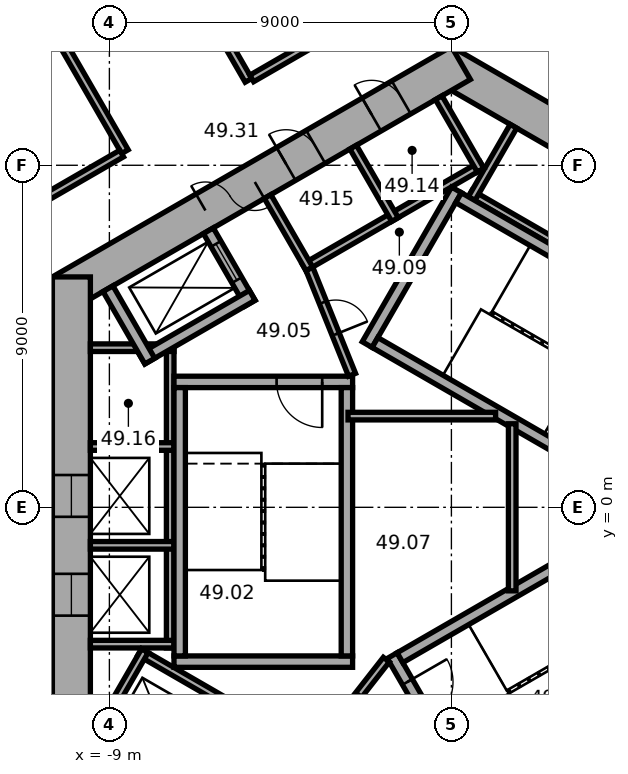
"""IFC4 building model, lengths in metres.
Left out: names, types, materials, properties, quantities, classifications, styles, units other than length and angle.
Written with IfcOpenShell. Run it as: python <this file> out.ifc"""

import sys

from ifc_helpers import new_model, si_unit, direction, frame, frame_2d, origin, place, context, subcontext, project, spatial, rectangle, extrude, element, fill, save


model = new_model("IFC4")
c1 = context("Model", 3, precision=1e-05, world=origin(), true_north=direction((0.0, 1.0)))
c2 = subcontext(c1, "Body", "Model", "MODEL_VIEW")
j1 = project(units=[si_unit("LENGTHUNIT", "METRE"), si_unit("PLANEANGLEUNIT", "RADIAN")], contexts=[c1])
p1 = place(None, origin())
s1 = spatial("IfcSite", under=j1, at=p1, CompositionType="ELEMENT")
p2 = place(p1, origin())
s2 = spatial("IfcBuilding", under=s1, at=p2, CompositionType="ELEMENT")
p3 = place(p2, frame((0.0, 0.0, 198.4)))
s3 = spatial("IfcBuildingStorey", under=s2, at=p3, CompositionType="ELEMENT", Elevation=198.4)
p4 = place(p3, frame((10.25, 5.629, 0.0), z_axis=(0.0, 0.0, 1.0), x_axis=(-0.866022616891, 0.50000482701, 0.0)))
e1 = element("IfcWall", 1, at=p4, inside=s3, PredefinedType="SHEAR", context=c2, shape_type="SweptSolid", body=[
    extrude(rectangle(XDim=12.125, YDim=1.0, at=frame_2d((6.062, 0.0))), origin(), (0.0, 0.0, 1.0), 3.7),
])
p5 = place(p4, frame((2.712, 0.0, 0.0)))
e2 = element("IfcOpeningElement", 2, at=p5, cuts=e1, PredefinedType="OPENING", context=c2, shape_type="SweptSolid", body=[
    extrude(rectangle(XDim=0.9, YDim=2.1, at=frame_2d((0.45, 1.05))), frame((0.0, 0.51, 0.0), z_axis=(0.0, -1.0, 0.0), x_axis=(1.0, 0.0, 0.0)), (0.0, 0.0, 1.0), 1.02),
])
p6 = place(p4, frame((6.612, 0.0, 0.0)))
e3 = element("IfcOpeningElement", 3, at=p6, cuts=e1, PredefinedType="OPENING", context=c2, shape_type="SweptSolid", body=[
    extrude(rectangle(XDim=0.9, YDim=2.1, at=frame_2d((0.45, 1.05))), frame((0.0, 0.51, 0.0), z_axis=(0.0, -1.0, 0.0), x_axis=(1.0, 0.0, 0.0)), (0.0, 0.0, 1.0), 1.02),
])
p7 = place(p3, frame((0.25, 11.691, 0.0), z_axis=(0.0, 0.0, 1.0), x_axis=(-0.866022616891, -0.50000482701, 0.0)))
e4 = element("IfcWall", 4, at=p7, inside=s3, PredefinedType="SHEAR", context=c2, shape_type="SweptSolid", body=[
    extrude(rectangle(XDim=12.125, YDim=1.0, at=frame_2d((6.062, 0.0))), origin(), (0.0, 0.0, 1.0), 3.7),
])
p8 = place(p7, frame((6.262, 0.0, 0.0)))
e5 = element("IfcOpeningElement", 5, at=p8, cuts=e4, PredefinedType="OPENING", context=c2, shape_type="SweptSolid", body=[
    extrude(rectangle(XDim=1.5, YDim=2.1, at=frame_2d((0.75, 1.05))), frame((0.0, 0.51, 0.0), z_axis=(0.0, -1.0, 0.0), x_axis=(1.0, 0.0, 0.0)), (0.0, 0.0, 1.0), 1.02),
])
p9 = place(p7, frame((1.812, 0.0, 0.0)))
e6 = element("IfcOpeningElement", 6, at=p9, cuts=e4, PredefinedType="OPENING", context=c2, shape_type="SweptSolid", body=[
    extrude(rectangle(XDim=0.9, YDim=2.1, at=frame_2d((0.45, 1.05))), frame((0.0, 0.51, 0.0), z_axis=(0.0, -1.0, 0.0), x_axis=(1.0, 0.0, 0.0)), (0.0, 0.0, 1.0), 1.02),
])
p10 = place(p7, frame((4.412, 0.0, 0.0)))
e7 = element("IfcOpeningElement", 7, at=p10, cuts=e4, PredefinedType="OPENING", context=c2, shape_type="SweptSolid", body=[
    extrude(rectangle(XDim=0.9, YDim=2.1, at=frame_2d((0.45, 1.05))), frame((0.0, 0.51, 0.0), z_axis=(0.0, -1.0, 0.0), x_axis=(1.0, 0.0, 0.0)), (0.0, 0.0, 1.0), 1.02),
])
p11 = place(p3, frame((-10.0, 6.062, 0.0), z_axis=(0.0, 0.0, 1.0), x_axis=(0.0, -1.0, 0.0)))
e8 = element("IfcWall", 8, at=p11, inside=s3, PredefinedType="SHEAR", context=c2, shape_type="SweptSolid", body=[
    extrude(rectangle(XDim=12.125, YDim=1.0, at=frame_2d((6.062, 0.0))), origin(), (0.0, 0.0, 1.0), 3.7),
])
p12 = place(p11, frame((5.212, 0.0, 0.0)))
e9 = element("IfcOpeningElement", 9, at=p12, cuts=e8, PredefinedType="OPENING", context=c2, shape_type="SweptSolid", body=[
    extrude(rectangle(XDim=1.1, YDim=2.1, at=frame_2d((0.55, 1.05))), frame((0.0, 0.51, 0.0), z_axis=(0.0, -1.0, 0.0), x_axis=(1.0, 0.0, 0.0)), (0.0, 0.0, 1.0), 1.02),
])
p13 = place(p11, frame((7.812, 0.0, 0.0)))
e10 = element("IfcOpeningElement", 10, at=p13, cuts=e8, PredefinedType="OPENING", context=c2, shape_type="SweptSolid", body=[
    extrude(rectangle(XDim=1.1, YDim=2.1, at=frame_2d((0.55, 1.05))), frame((0.0, 0.51, 0.0), z_axis=(0.0, -1.0, 0.0), x_axis=(1.0, 0.0, 0.0)), (0.0, 0.0, 1.0), 1.02),
])
p14 = place(p3, frame((7.424, 4.259, 0.0), z_axis=(0.0, 0.0, 1.0), x_axis=(-0.866026010844, 0.49999894854, 0.0)))
e11 = element("IfcWall", 11, at=p14, inside=s3, PredefinedType="PARTITIONING", context=c2, shape_type="SweptSolid", body=[
    extrude(rectangle(XDim=8.0, YDim=0.2, at=frame_2d((4.0, 0.0))), origin(), (0.0, 0.0, 1.0), 3.42),
])
p15 = place(p3, frame((0.532, 8.122, 0.0), z_axis=(0.0, 0.0, 1.0), x_axis=(0.500077893725, 0.86598042715, 0.0)))
e12 = element("IfcWall", 12, at=p15, inside=s3, PredefinedType="PARTITIONING", context=c2, shape_type="SweptSolid", body=[
    extrude(rectangle(XDim=2.2, YDim=0.2, at=frame_2d((1.1, 0.0))), origin(), (0.0, 0.0, 1.0), 3.42),
])
p16 = place(p3, frame((0.803, 9.009, 0.0), z_axis=(0.0, 0.0, 1.0), x_axis=(-0.866028230842, -0.499995103361, 0.0)))
e13 = element("IfcWall", 13, at=p16, inside=s3, PredefinedType="PARTITIONING", context=c2, shape_type="SweptSolid", body=[
    extrude(rectangle(XDim=5.4, YDim=0.2, at=frame_2d((2.7, 0.0))), origin(), (0.0, 0.0, 1.0), 3.42),
])
p17 = place(p3, frame((0.767, 8.872, 0.0), z_axis=(0.0, 0.0, 1.0), x_axis=(-0.499994660107, 0.866028486751, 0.0)))
e14 = element("IfcWall", 14, at=p17, inside=s3, PredefinedType="PARTITIONING", context=c2, shape_type="SweptSolid", body=[
    extrude(rectangle(XDim=2.2, YDim=0.2, at=frame_2d((1.1, 0.0))), origin(), (0.0, 0.0, 1.0), 3.42),
])
for number, where, z_axis, x_axis in (
    (15, (-1.485, 7.572, 0.0), (0.0, 0.0, 1.0), (-0.5, 0.866, 0.0)),
    (16, (-3.737, 6.272, 0.0), (0.0, 0.0, 1.0), (-0.5, 0.866, 0.0)),
):
    element("IfcWall", number, at=place(p3, frame(where, z_axis=z_axis, x_axis=x_axis)), inside=s3, PredefinedType="PARTITIONING", context=c2, shape_type="SweptSolid", body=[
        extrude(rectangle(XDim=2.2, YDim=0.2, at=frame_2d((1.1, 0.0))), origin(), (0.0, 0.0, 1.0), 3.42),
    ])
p18 = place(p3, frame((-7.4, 4.3, 0.0), z_axis=(0.0, 0.0, 1.0), x_axis=(0.0, -1.0, 0.0)))
e17 = element("IfcWall", 17, at=p18, inside=s3, PredefinedType="PARTITIONING", context=c2, shape_type="SweptSolid", body=[
    extrude(rectangle(XDim=8.0, YDim=0.2, at=frame_2d((4.0, 0.0))), origin(), (0.0, 0.0, 1.0), 3.42),
])
for number, where, z_axis, x_axis in (
    (18, (-7.3, 4.2, 0.0), (0.0, 0.0, 1.0), (-1.0, 0.0, 0.0)),
    (19, (-7.3, 1.6, 0.0), (0.0, 0.0, 1.0), (-1.0, 0.0, 0.0)),
    (20, (-7.3, -1.0, 0.0), (0.0, 0.0, 1.0), (-1.0, 0.0, 0.0)),
    (21, (-7.3, -3.6, 0.0), (0.0, 0.0, 1.0), (-1.0, 0.0, 0.0)),
):
    element("IfcWall", number, at=place(p3, frame(where, z_axis=z_axis, x_axis=x_axis)), inside=s3, PredefinedType="PARTITIONING", context=c2, shape_type="SweptSolid", body=[
        extrude(rectangle(XDim=2.2, YDim=0.2, at=frame_2d((1.1, 0.0))), origin(), (0.0, 0.0, 1.0), 3.42),
    ])
p19 = place(p3, frame((-8.203, -3.809, 0.0), z_axis=(0.0, 0.0, 1.0), x_axis=(0.866028230842, -0.499995103361, 0.0)))
e22 = element("IfcWall", 22, at=p19, inside=s3, PredefinedType="PARTITIONING", context=c2, shape_type="SweptSolid", body=[
    extrude(rectangle(XDim=5.4, YDim=0.2, at=frame_2d((2.7, 0.0))), origin(), (0.0, 0.0, 1.0), 3.42),
])
p20 = place(p3, frame((-8.067, -3.772, 0.0), z_axis=(0.0, 0.0, 1.0), x_axis=(-0.50002983664, -0.866008176907, 0.0)))
e23 = element("IfcWall", 23, at=p20, inside=s3, PredefinedType="PARTITIONING", context=c2, shape_type="SweptSolid", body=[
    extrude(rectangle(XDim=2.2, YDim=0.2, at=frame_2d((1.1, 0.0))), origin(), (0.0, 0.0, 1.0), 3.42),
])
p21 = place(p3, frame((-0.024, -8.559, 0.0), z_axis=(0.0, 0.0, 1.0), x_axis=(0.866026010844, 0.49999894854, 0.0)))
e24 = element("IfcWall", 24, at=p21, inside=s3, PredefinedType="PARTITIONING", context=c2, shape_type="SweptSolid", body=[
    extrude(rectangle(XDim=8.0, YDim=0.2, at=frame_2d((4.0, 0.0))), origin(), (0.0, 0.0, 1.0), 3.42),
])
p22 = place(p3, frame((-2.216, 4.282, 0.0), z_axis=(0.0, 0.0, 1.0), x_axis=(0.499977259774, 0.866038532462, 0.0)))
e25 = element("IfcWall", 25, at=p22, inside=s3, PredefinedType="SHEAR", context=c2, shape_type="SweptSolid", body=[
    extrude(rectangle(XDim=4.7, YDim=0.3, at=frame_2d((2.35, 0.0))), origin(), (0.0, 0.0, 1.0), 3.42),
])
for number, where, z_axis, x_axis in (
    (26, (4.103, 0.807, 0.0), (0.0, 0.0, 1.0), (-0.866, 0.5, 0.0)),
    (27, (6.303, 4.617, 0.0), (0.0, 0.0, 1.0), (-0.866, 0.5, 0.0)),
):
    element("IfcWall", number, at=place(p3, frame(where, z_axis=z_axis, x_axis=x_axis)), inside=s3, PredefinedType="SHEAR", context=c2, shape_type="SweptSolid", body=[
        extrude(rectangle(XDim=7.06, YDim=0.3, at=frame_2d((3.53, 0.0))), origin(), (0.0, 0.0, 1.0), 3.42),
    ])
p23 = place(p3, frame((-2.6, 3.3, 0.0), z_axis=(0.0, 0.0, 1.0), x_axis=(-1.0, 0.0, 0.0)))
e28 = element("IfcWall", 28, at=p23, inside=s3, PredefinedType="SHEAR", context=c2, shape_type="SweptSolid", body=[
    extrude(rectangle(XDim=4.7, YDim=0.3, at=frame_2d((2.35, 0.0))), origin(), (0.0, 0.0, 1.0), 3.42),
])
p24 = place(p23, frame((0.8, 0.0, 0.0)))
e29 = element("IfcOpeningElement", 29, at=p24, cuts=e28, PredefinedType="OPENING", context=c2, shape_type="SweptSolid", body=[
    extrude(rectangle(XDim=1.2, YDim=2.1, at=frame_2d((0.6, 1.05))), frame((0.0, 0.16, 0.0), z_axis=(0.0, -1.0, 0.0), x_axis=(1.0, 0.0, 0.0)), (0.0, 0.0, 1.0), 0.32),
])
p25 = place(p3, frame((-2.6, -4.06, 0.0), z_axis=(0.0, 0.0, 1.0), x_axis=(-1.0, 0.0, 0.0)))
e30 = element("IfcWall", 30, at=p25, inside=s3, PredefinedType="SHEAR", context=c2, shape_type="SweptSolid", body=[
    extrude(rectangle(XDim=4.7, YDim=0.3, at=frame_2d((2.35, 0.0))), origin(), (0.0, 0.0, 1.0), 3.42),
])
for number, where, z_axis, x_axis in (
    (31, (-2.75, 3.15, 0.0), (0.0, 0.0, 1.0), (0.0, -1.0, 0.0)),
    (32, (-7.15, 3.15, 0.0), (0.0, 0.0, 1.0), (0.0, -1.0, 0.0)),
):
    element("IfcWall", number, at=place(p3, frame(where, z_axis=z_axis, x_axis=x_axis)), inside=s3, PredefinedType="SHEAR", context=c2, shape_type="SweptSolid", body=[
        extrude(rectangle(XDim=7.06, YDim=0.3, at=frame_2d((3.53, 0.0))), origin(), (0.0, 0.0, 1.0), 3.42),
    ])
p26 = place(p3, frame((-1.558, -3.902, 0.0), z_axis=(0.0, 0.0, 1.0), x_axis=(0.499977259774, -0.866038532462, 0.0)))
e33 = element("IfcWall", 33, at=p26, inside=s3, PredefinedType="SHEAR", context=c2, shape_type="SweptSolid", body=[
    extrude(rectangle(XDim=4.7, YDim=0.3, at=frame_2d((2.35, 0.0))), origin(), (0.0, 0.0, 1.0), 3.42),
])
p27 = place(p26, frame((0.8, 0.0, 0.0)))
e34 = element("IfcOpeningElement", 34, at=p27, cuts=e33, PredefinedType="OPENING", context=c2, shape_type="SweptSolid", body=[
    extrude(rectangle(XDim=1.2, YDim=2.1, at=frame_2d((0.6, 1.05))), frame((0.0, 0.16, 0.0), z_axis=(0.0, -1.0, 0.0), x_axis=(1.0, 0.0, 0.0)), (0.0, 0.0, 1.0), 0.32),
])
for number, where, z_axis, x_axis in (
    (35, (-1.353, -3.957, 0.0), (0.0, 0.0, 1.0), (0.866, 0.5, 0.0)),
    (36, (0.847, -7.767, 0.0), (0.0, 0.0, 1.0), (0.866, 0.5, 0.0)),
):
    element("IfcWall", number, at=place(p3, frame(where, z_axis=z_axis, x_axis=x_axis)), inside=s3, PredefinedType="SHEAR", context=c2, shape_type="SweptSolid", body=[
        extrude(rectangle(XDim=7.06, YDim=0.3, at=frame_2d((3.53, 0.0))), origin(), (0.0, 0.0, 1.0), 3.42),
    ])
p28 = place(p3, frame((-5.295, 5.372, 0.0), z_axis=(0.0, 0.0, 1.0), x_axis=(-0.500077893725, 0.86598042715, 0.0)))
e37 = element("IfcWall", 37, at=p28, inside=s3, PredefinedType="SHEAR", context=c2, shape_type="SweptSolid", body=[
    extrude(rectangle(XDim=2.2, YDim=0.3, at=frame_2d((1.1, 0.0))), origin(), (0.0, 0.0, 1.0), 3.42),
])
p29 = place(p28, frame((0.7, 0.0, 0.0)))
e38 = element("IfcOpeningElement", 38, at=p29, cuts=e37, PredefinedType="OPENING", context=c2, shape_type="SweptSolid", body=[
    extrude(rectangle(XDim=1.1, YDim=2.1, at=frame_2d((0.55, 1.05))), frame((0.0, 0.16, 0.0), z_axis=(0.0, -1.0, 0.0), x_axis=(1.0, 0.0, 0.0)), (0.0, 0.0, 1.0), 0.32),
])
p30 = place(p3, frame((-5.24, 5.577, 0.0), z_axis=(0.0, 0.0, 1.0), x_axis=(-0.866014461049, -0.500018952895, 0.0)))
e39 = element("IfcWall", 39, at=p30, inside=s3, PredefinedType="SHEAR", context=c2, shape_type="SweptSolid", body=[
    extrude(rectangle(XDim=3.35, YDim=0.3, at=frame_2d((1.675, 0.0))), origin(), (0.0, 0.0, 1.0), 3.42),
])
p31 = place(p3, frame((-7.937, 3.847, 0.0), z_axis=(0.0, 0.0, 1.0), x_axis=(-0.50002983664, 0.866008176907, 0.0)))
e40 = element("IfcWall", 40, at=p31, inside=s3, PredefinedType="SHEAR", context=c2, shape_type="SweptSolid", body=[
    extrude(rectangle(XDim=2.2, YDim=0.3, at=frame_2d((1.1, 0.0))), origin(), (0.0, 0.0, 1.0), 3.42),
])
p32 = place(p3, frame((-2.615, 3.487, 0.0), z_axis=(0.0, 0.0, 1.0), x_axis=(-0.373576831041, 0.92759924068, 0.0)))
e41 = element("IfcWall", 41, at=p32, inside=s3, PredefinedType="PARTITIONING", context=c2, shape_type="SweptSolid", body=[
    extrude(rectangle(XDim=3.002, YDim=0.2, at=frame_2d((1.501, 0.0))), origin(), (0.0, 0.0, 1.0), 3.42),
])
p33 = place(p32, frame((1.15, 0.0, 0.0)))
e42 = element("IfcOpeningElement", 42, at=p33, cuts=e41, PredefinedType="OPENING", context=c2, shape_type="SweptSolid", body=[
    extrude(rectangle(XDim=0.9, YDim=2.1, at=frame_2d((0.45, 1.05))), frame((0.0, 0.11, 0.0), z_axis=(0.0, -1.0, 0.0), x_axis=(1.0, 0.0, 0.0)), (0.0, 0.0, 1.0), 0.22),
])
p34 = place(p3, frame((-1.712, -4.008, 0.0), z_axis=(0.0, 0.0, 1.0), x_axis=(-0.616549420702, -0.787316208287, 0.0)))
e43 = element("IfcWall", 43, at=p34, inside=s3, PredefinedType="PARTITIONING", context=c2, shape_type="SweptSolid", body=[
    extrude(rectangle(XDim=3.002, YDim=0.2, at=frame_2d((1.501, 0.0))), origin(), (0.0, 0.0, 1.0), 3.42),
])
p35 = place(p34, frame((1.15, 0.0, 0.0)))
e44 = element("IfcOpeningElement", 44, at=p35, cuts=e43, PredefinedType="OPENING", context=c2, shape_type="SweptSolid", body=[
    extrude(rectangle(XDim=0.9, YDim=2.1, at=frame_2d((0.45, 1.05))), frame((0.0, 0.11, 0.0), z_axis=(0.0, -1.0, 0.0), x_axis=(1.0, 0.0, 0.0)), (0.0, 0.0, 1.0), 0.22),
])
p36 = place(p3, frame((-2.72, 2.4, 0.0), z_axis=(0.0, 0.0, 1.0), x_axis=(1.0, 0.0, 0.0)))
e45 = element("IfcWall", 45, at=p36, inside=s3, PredefinedType="PARTITIONING", context=c2, shape_type="SweptSolid", body=[
    extrude(rectangle(XDim=3.883, YDim=0.2, at=frame_2d((1.941, 0.0))), origin(), (0.0, 0.0, 1.0), 3.42),
])
p37 = place(p3, frame((1.6, -2.198, 0.0), z_axis=(0.0, 0.0, 1.0), x_axis=(0.0, 1.0, 0.0)))
e46 = element("IfcWall", 46, at=p37, inside=s3, PredefinedType="PARTITIONING", context=c2, shape_type="SweptSolid", body=[
    extrude(rectangle(XDim=4.397, YDim=0.2, at=frame_2d((2.198, 0.0))), origin(), (0.0, 0.0, 1.0), 3.42),
])
p38 = place(p3, frame((-12.766, 16.589, 0.0), z_axis=(0.0, 0.0, 1.0), x_axis=(0.500010139422, -0.866019549707, 0.0)))
e47 = element("IfcWall", 47, at=p38, inside=s3, PredefinedType="PARTITIONING", context=c2, shape_type="SweptSolid", body=[
    extrude(rectangle(XDim=8.35, YDim=0.2, at=frame_2d((4.175, 0.0))), origin(), (0.0, 0.0, 1.0), 3.42),
])
p39 = place(p38, frame((3.675, 0.0, 0.0)))
e48 = element("IfcOpeningElement", 48, at=p39, cuts=e47, PredefinedType="OPENING", context=c2, shape_type="SweptSolid", body=[
    extrude(rectangle(XDim=1.0, YDim=2.1, at=frame_2d((0.5, 1.05))), frame((0.0, 0.11, 0.0), z_axis=(0.0, -1.0, 0.0), x_axis=(1.0, 0.0, 0.0)), (0.0, 0.0, 1.0), 0.22),
])
p40 = place(p3, frame((-9.515, 18.466, 0.0), z_axis=(0.0, 0.0, 1.0), x_axis=(0.500010139422, -0.866019549707, 0.0)))
e49 = element("IfcWall", 49, at=p40, inside=s3, PredefinedType="PARTITIONING", context=c2, shape_type="SweptSolid", body=[
    extrude(rectangle(XDim=8.35, YDim=0.2, at=frame_2d((4.175, 0.0))), origin(), (0.0, 0.0, 1.0), 2.87),
])
p41 = place(p40, frame((3.675, 0.0, 0.0)))
e50 = element("IfcOpeningElement", 50, at=p41, cuts=e49, PredefinedType="OPENING", context=c2, shape_type="SweptSolid", body=[
    extrude(rectangle(XDim=1.0, YDim=2.1, at=frame_2d((0.5, 1.05))), frame((0.0, 0.11, 0.0), z_axis=(0.0, -1.0, 0.0), x_axis=(1.0, 0.0, 0.0)), (0.0, 0.0, 1.0), 0.22),
])
p42 = place(p3, frame((-8.678, 9.308, 0.0), z_axis=(0.0, 0.0, 1.0), x_axis=(-0.866000359435, -0.500043375578, 0.0)))
e51 = element("IfcWall", 51, at=p42, inside=s3, PredefinedType="PARTITIONING", context=c2, shape_type="SweptSolid", body=[
    extrude(rectangle(XDim=3.161, YDim=0.2, at=frame_2d((1.581, 0.0))), origin(), (0.0, 0.0, 1.0), 3.42),
])
p43 = place(p3, frame((-0.95, 13.77, 0.0), z_axis=(0.0, 0.0, 1.0), x_axis=(-0.866036689987, -0.499980451214, 0.0)))
e52 = element("IfcWall", 52, at=p43, inside=s3, PredefinedType="PARTITIONING", context=c2, shape_type="SweptSolid", body=[
    extrude(rectangle(XDim=4.969, YDim=0.2, at=frame_2d((2.485, 0.0))), origin(), (0.0, 0.0, 1.0), 3.42),
])
p44 = place(p3, frame((5.713, 11.02, 0.0), z_axis=(0.0, 0.0, 1.0), x_axis=(-0.866038905227, 0.499976614087, 0.0)))
e53 = element("IfcWall", 53, at=p44, inside=s3, PredefinedType="PARTITIONING", context=c2, shape_type="SweptSolid", body=[
    extrude(rectangle(XDim=5.46, YDim=0.2, at=frame_2d((2.73, 0.0))), origin(), (0.0, 0.0, 1.0), 3.42),
])
p45 = place(p44, frame((3.955, 0.0, 0.0)))
e54 = element("IfcOpeningElement", 54, at=p45, cuts=e53, PredefinedType="OPENING", context=c2, shape_type="SweptSolid", body=[
    extrude(rectangle(XDim=1.0, YDim=2.1, at=frame_2d((0.5, 1.05))), frame((0.0, 0.11, 0.0), z_axis=(0.0, -1.0, 0.0), x_axis=(1.0, 0.0, 0.0)), (0.0, 0.0, 1.0), 0.22),
])
p46 = place(p8, origin())
e55 = element("IfcDoor", 55, at=p46, inside=s3, OperationType="DOUBLE_DOOR_SINGLE_SWING", PredefinedType="DOOR", context=c2, shape_type="SweptSolid", body=[
    extrude(rectangle(XDim=1.5, YDim=2.1, at=frame_2d((0.75, 1.05))), frame((0.0, 0.025, 0.0), z_axis=(0.0, -1.0, 0.0), x_axis=(1.0, 0.0, 0.0)), (0.0, 0.0, 1.0), 0.05),
])
fill(e5, e55)
p47 = place(p24, origin())
e56 = element("IfcDoor", 56, at=p47, inside=s3, OperationType="SINGLE_SWING_RIGHT", PredefinedType="DOOR", context=c2, shape_type="SweptSolid", body=[
    extrude(rectangle(XDim=1.2, YDim=2.1, at=frame_2d((0.6, 1.05))), frame((0.0, 0.025, 0.0), z_axis=(0.0, -1.0, 0.0), x_axis=(1.0, 0.0, 0.0)), (0.0, 0.0, 1.0), 0.05),
])
fill(e29, e56)
p48 = place(p27, origin())
e57 = element("IfcDoor", 57, at=p48, inside=s3, OperationType="SINGLE_SWING_RIGHT", PredefinedType="DOOR", context=c2, shape_type="SweptSolid", body=[
    extrude(rectangle(XDim=1.2, YDim=2.1, at=frame_2d((0.6, 1.05))), frame((0.0, 0.025, 0.0), z_axis=(0.0, -1.0, 0.0), x_axis=(1.0, 0.0, 0.0)), (0.0, 0.0, 1.0), 0.05),
])
fill(e34, e57)
p49 = place(p33, origin())
e58 = element("IfcDoor", 58, at=p49, inside=s3, OperationType="SINGLE_SWING_LEFT", PredefinedType="DOOR", context=c2, shape_type="SweptSolid", body=[
    extrude(rectangle(XDim=0.9, YDim=2.1, at=frame_2d((0.45, 1.05))), frame((0.0, 0.025, 0.0), z_axis=(0.0, -1.0, 0.0), x_axis=(1.0, 0.0, 0.0)), (0.0, 0.0, 1.0), 0.05),
])
fill(e42, e58)
p50 = place(p35, origin())
e59 = element("IfcDoor", 59, at=p50, inside=s3, OperationType="SINGLE_SWING_LEFT", PredefinedType="DOOR", context=c2, shape_type="SweptSolid", body=[
    extrude(rectangle(XDim=0.9, YDim=2.1, at=frame_2d((0.45, 1.05))), frame((0.0, 0.025, 0.0), z_axis=(0.0, -1.0, 0.0), x_axis=(1.0, 0.0, 0.0)), (0.0, 0.0, 1.0), 0.05),
])
fill(e44, e59)
p51 = place(p9, origin())
e60 = element("IfcDoor", 60, at=p51, inside=s3, OperationType="SINGLE_SWING_LEFT", PredefinedType="DOOR", context=c2, shape_type="SweptSolid", body=[
    extrude(rectangle(XDim=0.9, YDim=2.1, at=frame_2d((0.45, 1.05))), frame((0.0, 0.025, 0.0), z_axis=(0.0, -1.0, 0.0), x_axis=(1.0, 0.0, 0.0)), (0.0, 0.0, 1.0), 0.05),
])
fill(e6, e60)
p52 = place(p10, origin())
e61 = element("IfcDoor", 61, at=p52, inside=s3, OperationType="SINGLE_SWING_LEFT", PredefinedType="DOOR", context=c2, shape_type="SweptSolid", body=[
    extrude(rectangle(XDim=0.9, YDim=2.1, at=frame_2d((0.45, 1.05))), frame((0.0, 0.025, 0.0), z_axis=(0.0, -1.0, 0.0), x_axis=(1.0, 0.0, 0.0)), (0.0, 0.0, 1.0), 0.05),
])
fill(e7, e61)
p53 = place(p29, origin())
e62 = element("IfcDoor", 62, at=p53, inside=s3, OperationType="DOUBLE_DOOR_SLIDING", PredefinedType="DOOR", context=c2, shape_type="SweptSolid", body=[
    extrude(rectangle(XDim=1.1, YDim=2.1, at=frame_2d((0.55, 1.05))), frame((0.0, 0.025, 0.0), z_axis=(0.0, -1.0, 0.0), x_axis=(1.0, 0.0, 0.0)), (0.0, 0.0, 1.0), 0.05),
])
fill(e38, e62)
p54 = place(p12, origin())
e63 = element("IfcDoor", 63, at=p54, inside=s3, OperationType="DOUBLE_DOOR_SLIDING", PredefinedType="DOOR", context=c2, shape_type="SweptSolid", body=[
    extrude(rectangle(XDim=1.1, YDim=2.1, at=frame_2d((0.55, 1.05))), frame((0.0, 0.025, 0.0), z_axis=(0.0, -1.0, 0.0), x_axis=(1.0, 0.0, 0.0)), (0.0, 0.0, 1.0), 0.05),
])
fill(e9, e63)
p55 = place(p13, origin())
e64 = element("IfcDoor", 64, at=p55, inside=s3, OperationType="DOUBLE_DOOR_SLIDING", PredefinedType="DOOR", context=c2, shape_type="SweptSolid", body=[
    extrude(rectangle(XDim=1.1, YDim=2.1, at=frame_2d((0.55, 1.05))), frame((0.0, 0.025, 0.0), z_axis=(0.0, -1.0, 0.0), x_axis=(1.0, 0.0, 0.0)), (0.0, 0.0, 1.0), 0.05),
])
fill(e10, e64)
save(model, sys.argv[1])
